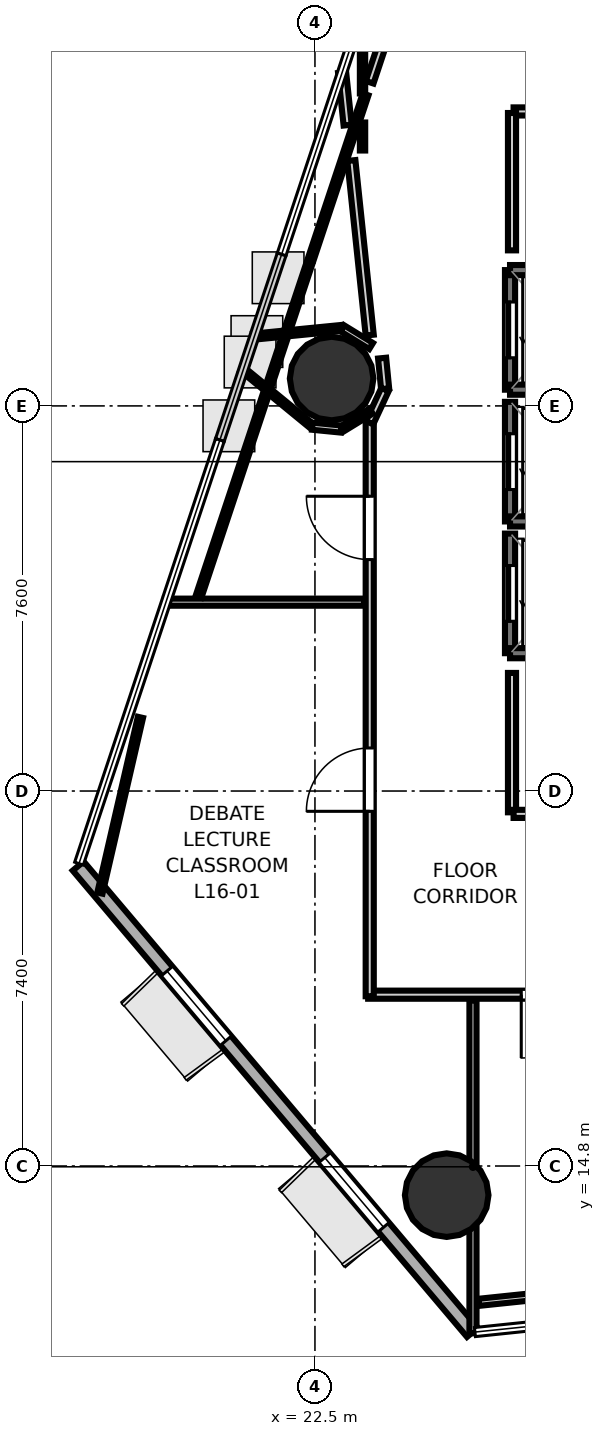
"""IFC4 building model, lengths in metres.
Left out: names, types, materials, properties, quantities, classifications, styles, units other than length and angle.
Written with IfcOpenShell. Run it as: python <this file> out.ifc"""

import sys

from ifc_helpers import new_model, si_unit, direction, frame, frame_2d, origin, origin_2d, place, context, subcontext, project, spatial, rectangle, hollow_circle, extrude, element, fill, save


model = new_model("IFC4")
c1 = context("Model", 3, precision=1e-05, world=origin(), true_north=direction((0.0, 1.0)))
c2 = subcontext(c1, "Body", "Model", "MODEL_VIEW")
j1 = project(units=[si_unit("LENGTHUNIT", "METRE"), si_unit("PLANEANGLEUNIT", "RADIAN")], contexts=[c1])
p1 = place(None, origin())
s1 = spatial("IfcSite", under=j1, at=p1, CompositionType="ELEMENT")
p2 = place(p1, origin())
s2 = spatial("IfcBuilding", under=s1, at=p2, CompositionType="ELEMENT")
p3 = place(p2, frame((0.0, 0.0, 67.3)))
s3 = spatial("IfcBuildingStorey", under=s2, at=p3, CompositionType="ELEMENT", Elevation=67.3)
for number, where, z_axis, x_axis in (
    (1, (22.829, 30.34, 0.0), (0.0, 0.0, 1.0), (1.0, 0.0, 0.0)),
    (2, (25.1, 14.225, 0.0), (0.0, 0.0, 1.0), (1.0, 0.0, 0.0)),
):
    element("IfcColumn", number, at=place(p3, frame(where, z_axis=z_axis, x_axis=x_axis)), inside=s3, PredefinedType="COLUMN", context=c2, shape_type="SweptSolid", body=[
        extrude(hollow_circle(Radius=0.825, WallThickness=0.04, at=origin_2d()), origin(), (0.0, 0.0, 1.0), 3.7),
    ])
p4 = place(p3, frame((17.827, 20.72, 0.0), z_axis=(0.0, 0.0, 1.0), x_axis=(0.645636137958, -0.763645190755, 0.0)))
e3 = element("IfcWall", 3, at=p4, inside=s3, PredefinedType="SOLIDWALL", context=c2, shape_type="SweptSolid", body=[
    extrude(rectangle(XDim=12.051, YDim=0.28, at=frame_2d((6.025, 0.0))), origin(), (0.0, 0.0, 1.0), 3.52),
])
p5 = place(p4, frame((2.715, 0.0, 0.85)))
e4 = element("IfcOpeningElement", 4, at=p5, cuts=e3, PredefinedType="OPENING", context=c2, shape_type="SweptSolid", body=[
    extrude(rectangle(XDim=1.8, YDim=2.1, at=frame_2d((0.9, 1.05))), frame((0.0, 0.15, 0.0), z_axis=(0.0, -1.0, 0.0), x_axis=(1.0, 0.0, 0.0)), (0.0, 0.0, 1.0), 0.3),
])
p6 = place(p4, frame((7.536, 0.0, 0.85)))
e5 = element("IfcOpeningElement", 5, at=p6, cuts=e3, PredefinedType="OPENING", context=c2, shape_type="SweptSolid", body=[
    extrude(rectangle(XDim=1.8, YDim=2.1, at=frame_2d((0.9, 1.05))), frame((0.0, 0.15, 0.0), z_axis=(0.0, -1.0, 0.0), x_axis=(1.0, 0.0, 0.0)), (0.0, 0.0, 1.0), 0.3),
])
p7 = place(p3, frame((26.35, 30.12, 0.0), z_axis=(0.0, 0.0, 1.0), x_axis=(0.0, 1.0, 0.0)))
e6 = element("IfcWall", 6, at=p7, inside=s3, PredefinedType="SOLIDWALL", context=c2, shape_type="SweptSolid", body=[
    extrude(rectangle(XDim=2.36, YDim=0.2, at=frame_2d((1.18, 0.0))), origin(), (0.0, 0.0, 1.0), 3.52),
])
p8 = place(p7, frame((0.63, 0.0, 0.0)))
e7 = element("IfcOpeningElement", 7, at=p8, cuts=e6, PredefinedType="OPENING", context=c2, shape_type="SweptSolid", body=[
    extrude(rectangle(XDim=1.1, YDim=2.15, at=frame_2d((0.55, 1.075))), frame((0.0, 0.11, 0.0), z_axis=(0.0, -1.0, 0.0), x_axis=(1.0, 0.0, 0.0)), (0.0, 0.0, 1.0), 0.22),
])
for number, where, z_axis, x_axis in (
    (8, (26.35, 32.48, 0.0), (0.0, 0.0, 1.0), (1.0, 0.0, 0.0)),
    (9, (26.35, 30.12, 0.0), (0.0, 0.0, 1.0), (1.0, 0.0, 0.0)),
):
    element("IfcWall", number, at=place(p3, frame(where, z_axis=z_axis, x_axis=x_axis)), inside=s3, PredefinedType="SOLIDWALL", context=c2, shape_type="SweptSolid", body=[
        extrude(rectangle(XDim=2.1, YDim=0.2, at=frame_2d((1.05, 0.0))), origin(), (0.0, 0.0, 1.0), 3.52),
    ])
p9 = place(p3, frame((26.35, 27.52, 0.0), z_axis=(0.0, 0.0, 1.0), x_axis=(0.0, 1.0, 0.0)))
e10 = element("IfcWall", 10, at=p9, inside=s3, PredefinedType="SOLIDWALL", context=c2, shape_type="SweptSolid", body=[
    extrude(rectangle(XDim=2.36, YDim=0.2, at=frame_2d((1.18, 0.0))), origin(), (0.0, 0.0, 1.0), 3.52),
])
p10 = place(p9, frame((0.63, 0.0, 0.0)))
e11 = element("IfcOpeningElement", 11, at=p10, cuts=e10, PredefinedType="OPENING", context=c2, shape_type="SweptSolid", body=[
    extrude(rectangle(XDim=1.1, YDim=2.15, at=frame_2d((0.55, 1.075))), frame((0.0, 0.11, 0.0), z_axis=(0.0, -1.0, 0.0), x_axis=(1.0, 0.0, 0.0)), (0.0, 0.0, 1.0), 0.22),
])
p11 = place(p3, frame((26.35, 27.52, 0.0), z_axis=(0.0, 0.0, 1.0), x_axis=(1.0, 0.0, 0.0)))
e12 = element("IfcWall", 12, at=p11, inside=s3, PredefinedType="SOLIDWALL", context=c2, shape_type="SweptSolid", body=[
    extrude(rectangle(XDim=2.1, YDim=0.2, at=frame_2d((1.05, 0.0))), origin(), (0.0, 0.0, 1.0), 3.52),
])
p12 = place(p3, frame((26.35, 24.92, 0.0), z_axis=(0.0, 0.0, 1.0), x_axis=(0.0, 1.0, 0.0)))
e13 = element("IfcWall", 13, at=p12, inside=s3, PredefinedType="SOLIDWALL", context=c2, shape_type="SweptSolid", body=[
    extrude(rectangle(XDim=2.36, YDim=0.2, at=frame_2d((1.18, 0.0))), origin(), (0.0, 0.0, 1.0), 3.52),
])
p13 = place(p12, frame((0.63, 0.0, 0.0)))
e14 = element("IfcOpeningElement", 14, at=p13, cuts=e13, PredefinedType="OPENING", context=c2, shape_type="SweptSolid", body=[
    extrude(rectangle(XDim=1.1, YDim=2.15, at=frame_2d((0.55, 1.075))), frame((0.0, 0.11, 0.0), z_axis=(0.0, -1.0, 0.0), x_axis=(1.0, 0.0, 0.0)), (0.0, 0.0, 1.0), 0.22),
])
p14 = place(p3, frame((26.35, 24.92, 0.0), z_axis=(0.0, 0.0, 1.0), x_axis=(1.0, 0.0, 0.0)))
e15 = element("IfcWall", 15, at=p14, inside=s3, PredefinedType="SOLIDWALL", context=c2, shape_type="SweptSolid", body=[
    extrude(rectangle(XDim=2.1, YDim=0.2, at=frame_2d((1.05, 0.0))), origin(), (0.0, 0.0, 1.0), 3.52),
])
p15 = place(p3, frame((23.581, 31.197, 0.0), z_axis=(0.0, 0.0, 1.0), x_axis=(-0.104644434472, 0.994509699467, 0.0)))
e16 = element("IfcWall", 16, at=p15, inside=s3, PredefinedType="PARTITIONING", context=c2, shape_type="SweptSolid", body=[
    extrude(rectangle(XDim=3.465, YDim=0.16, at=frame_2d((1.732, 0.0))), origin(), (0.0, 0.0, 1.0), 2.798),
])
p16 = place(p3, frame((23.579, 36.187, 0.0), z_axis=(0.0, 0.0, 1.0), x_axis=(0.315640384711, 0.948878889816, 0.0)))
e17 = element("IfcWall", 17, at=p16, inside=s3, PredefinedType="PARTITIONING", context=c2, shape_type="SweptSolid", body=[
    extrude(rectangle(XDim=2.743, YDim=0.16, at=frame_2d((1.372, 0.0))), origin(), (0.0, 0.0, 1.0), 2.84),
])
p17 = place(p3, frame((29.7, 35.611, 0.0), z_axis=(0.0, 0.0, 1.0), x_axis=(-1.0, 0.0, 0.0)))
e18 = element("IfcWall", 18, at=p17, inside=s3, PredefinedType="PARTITIONING", context=c2, shape_type="SweptSolid", body=[
    extrude(rectangle(XDim=3.28, YDim=0.16, at=frame_2d((1.64, 0.0))), origin(), (0.0, 0.0, 1.0), 2.798),
])
p18 = place(p3, frame((26.389, 35.58, 0.0), z_axis=(0.0, 0.0, 1.0), x_axis=(0.0, -1.0, 0.0)))
e19 = element("IfcWall", 19, at=p18, inside=s3, PredefinedType="PARTITIONING", context=c2, shape_type="SweptSolid", body=[
    extrude(rectangle(XDim=2.71, YDim=0.16, at=frame_2d((1.355, 0.0))), origin(), (0.0, 0.0, 1.0), 2.798),
])
p19 = place(p3, frame((26.389, 24.531, 0.0), z_axis=(0.0, 0.0, 1.0), x_axis=(0.0, -1.0, 0.0)))
e20 = element("IfcWall", 20, at=p19, inside=s3, PredefinedType="PARTITIONING", context=c2, shape_type="SweptSolid", body=[
    extrude(rectangle(XDim=2.75, YDim=0.16, at=frame_2d((1.375, 0.0))), origin(), (0.0, 0.0, 1.0), 2.84),
])
p20 = place(p3, frame((26.42, 21.749, 0.0), z_axis=(0.0, 0.0, 1.0), x_axis=(1.0, 0.0, 0.0)))
e21 = element("IfcWall", 21, at=p20, inside=s3, PredefinedType="PARTITIONING", context=c2, shape_type="SweptSolid", body=[
    extrude(rectangle(XDim=3.28, YDim=0.16, at=frame_2d((1.64, 0.0))), origin(), (0.0, 0.0, 1.0), 2.84),
])
p21 = place(p3, frame((33.32, 18.181, 0.0), z_axis=(0.0, 0.0, 1.0), x_axis=(-1.0, 0.0, 0.0)))
e22 = element("IfcWall", 22, at=p21, inside=s3, PredefinedType="PARTITIONING", context=c2, shape_type="SweptSolid", body=[
    extrude(rectangle(XDim=9.77, YDim=0.16, at=frame_2d((4.885, 0.0))), origin(), (0.0, 0.0, 1.0), 2.798),
])
p22 = place(p21, frame((5.499, 0.0, 0.0)))
e23 = element("IfcOpeningElement", 23, at=p22, cuts=e22, PredefinedType="OPENING", context=c2, shape_type="SweptSolid", body=[
    extrude(rectangle(XDim=1.25, YDim=2.2, at=frame_2d((0.625, 1.1))), frame((0.0, 0.09, 0.0), z_axis=(0.0, -1.0, 0.0), x_axis=(1.0, 0.0, 0.0)), (0.0, 0.0, 1.0), 0.18),
])
p23 = place(p3, frame((23.581, 18.15, 0.0), z_axis=(0.0, 0.0, 1.0), x_axis=(0.0, 1.0, 0.0)))
e24 = element("IfcWall", 24, at=p23, inside=s3, PredefinedType="PARTITIONING", context=c2, shape_type="SweptSolid", body=[
    extrude(rectangle(XDim=11.333, YDim=0.16, at=frame_2d((5.667, 0.0))), origin(), (0.0, 0.0, 1.0), 2.798),
])
p24 = place(p23, frame((3.649, 0.0, 0.0)))
e25 = element("IfcOpeningElement", 25, at=p24, cuts=e24, PredefinedType="OPENING", context=c2, shape_type="SweptSolid", body=[
    extrude(rectangle(XDim=1.25, YDim=2.2, at=frame_2d((0.625, 1.1))), frame((0.0, 0.09, 0.0), z_axis=(0.0, -1.0, 0.0), x_axis=(1.0, 0.0, 0.0)), (0.0, 0.0, 1.0), 0.18),
])
p25 = place(p23, frame((8.617, 0.0, 0.0)))
e26 = element("IfcOpeningElement", 26, at=p25, cuts=e24, PredefinedType="OPENING", context=c2, shape_type="SweptSolid", body=[
    extrude(rectangle(XDim=1.25, YDim=2.2, at=frame_2d((0.625, 1.1))), frame((0.0, 0.09, 0.0), z_axis=(0.0, -1.0, 0.0), x_axis=(1.0, 0.0, 0.0)), (0.0, 0.0, 1.0), 0.18),
])
p26 = place(p3, frame((23.578, 29.47, 0.0), z_axis=(0.0, 0.0, 1.0), x_axis=(0.421827918194, 0.906675910914, 0.0)))
e27 = element("IfcWall", 27, at=p26, inside=s3, PredefinedType="PARTITIONING", context=c2, shape_type="SweptSolid", body=[
    extrude(rectangle(XDim=0.72, YDim=0.16, at=frame_2d((0.36, 0.0))), origin(), (0.0, 0.0, 1.0), 2.84),
])
p27 = place(p3, frame((23.885, 30.139, 0.0), z_axis=(0.0, 0.0, 1.0), x_axis=(-0.0981888168, 0.995167803064, 0.0)))
e28 = element("IfcWall", 28, at=p27, inside=s3, PredefinedType="PARTITIONING", context=c2, shape_type="SweptSolid", body=[
    extrude(rectangle(XDim=0.607, YDim=0.16, at=frame_2d((0.303, 0.0))), origin(), (0.0, 0.0, 1.0), 2.84),
])
p28 = place(p3, frame((25.619, 18.07, 0.0), z_axis=(0.0, 0.0, 1.0), x_axis=(0.0, -1.0, 0.0)))
e29 = element("IfcWall", 29, at=p28, inside=s3, PredefinedType="PARTITIONING", context=c2, shape_type="SweptSolid", body=[
    extrude(rectangle(XDim=6.571, YDim=0.14, at=frame_2d((3.286, 0.0))), origin(), (0.0, 0.0, 1.0), 2.798),
])
p29 = place(p3, frame((18.257, 20.186, 0.0), z_axis=(0.0, 0.0, 1.0), x_axis=(0.224608979618, 0.974448975716, 0.0)))
e30 = element("IfcWall", 30, at=p29, inside=s3, PredefinedType="PARTITIONING", context=c2, shape_type="SweptSolid", body=[
    extrude(rectangle(XDim=3.559, YDim=0.105, at=frame_2d((1.779, 0.0))), origin(), (0.0, 0.0, 1.0), 2.84),
])
p30 = place(p3, frame((19.539, 25.927, 0.0), z_axis=(0.0, 0.0, 1.0), x_axis=(1.0, 0.0, 0.0)))
e31 = element("IfcWall", 31, at=p30, inside=s3, PredefinedType="PARTITIONING", context=c2, shape_type="SweptSolid", body=[
    extrude(rectangle(XDim=3.931, YDim=0.14, at=frame_2d((1.965, 0.0))), origin(), (0.0, 0.0, 1.0), 2.798),
])
p31 = place(p3, frame((33.699, 12.941, 0.0), z_axis=(0.0, 0.0, 1.0), x_axis=(-0.994606169047, -0.103723519483, 0.0)))
e32 = element("IfcWall", 32, at=p31, inside=s3, PredefinedType="PARTITIONING", context=c2, shape_type="SweptSolid", body=[
    extrude(rectangle(XDim=8.012, YDim=0.14, at=frame_2d((4.006, 0.0))), origin(), (0.0, 0.0, 1.0), 2.84),
])
p32 = place(p3, frame((23.608, 30.982, 0.0), z_axis=(0.0, 0.0, 1.0), x_axis=(-0.852045812822, 0.523467222328, 0.0)))
e33 = element("IfcWall", 33, at=p32, inside=s3, PredefinedType="PARTITIONING", context=c2, shape_type="SweptSolid", body=[
    extrude(rectangle(XDim=0.67, YDim=0.14, at=frame_2d((0.335, 0.0))), origin(), (0.0, 0.0, 1.0), 2.798),
])
p33 = place(p3, frame((23.018, 31.337, 0.0), z_axis=(0.0, 0.0, 1.0), x_axis=(-0.995198081746, -0.097881449154, 0.0)))
e34 = element("IfcWall", 34, at=p33, inside=s3, PredefinedType="PARTITIONING", context=c2, shape_type="SweptSolid", body=[
    extrude(rectangle(XDim=1.743, YDim=0.12, at=frame_2d((0.872, 0.0))), origin(), (0.0, 0.0, 1.0), 2.798),
])
p34 = place(p3, frame((21.069, 30.525, 0.0), z_axis=(0.0, 0.0, 1.0), x_axis=(0.772988075941, -0.63442055015, 0.0)))
e35 = element("IfcWall", 35, at=p34, inside=s3, PredefinedType="PARTITIONING", context=c2, shape_type="SweptSolid", body=[
    extrude(rectangle(XDim=1.764, YDim=0.105, at=frame_2d((0.882, 0.0))), origin(), (0.0, 0.0, 1.0), 2.798),
])
p35 = place(p3, frame((22.449, 29.399, 0.0), z_axis=(0.0, 0.0, 1.0), x_axis=(0.995167364461, -0.098193262045, 0.0)))
e36 = element("IfcWall", 36, at=p35, inside=s3, PredefinedType="PARTITIONING", context=c2, shape_type="SweptSolid", body=[
    extrude(rectangle(XDim=0.572, YDim=0.14, at=frame_2d((0.286, 0.0))), origin(), (0.0, 0.0, 1.0), 2.798),
])
p36 = place(p3, frame((23.037, 29.347, 0.0), z_axis=(0.0, 0.0, 1.0), x_axis=(0.852045812822, 0.523467222328, 0.0)))
e37 = element("IfcWall", 37, at=p36, inside=s3, PredefinedType="PARTITIONING", context=c2, shape_type="SweptSolid", body=[
    extrude(rectangle(XDim=0.67, YDim=0.12, at=frame_2d((0.335, 0.0))), origin(), (0.0, 0.0, 1.0), 2.798),
])
p37 = place(p3, frame((20.201, 26.032, 0.0), z_axis=(0.0, 0.0, 1.0), x_axis=(0.315652901444, 0.948874726089, 0.0)))
e38 = element("IfcWall", 38, at=p37, inside=s3, PredefinedType="PARTITIONING", context=c2, shape_type="SweptSolid", body=[
    extrude(rectangle(XDim=10.448, YDim=0.12, at=frame_2d((5.224, 0.0))), origin(), (0.0, 0.0, 1.0), 2.798),
])
p38 = place(p3, frame((23.439, 37.609, 0.0), z_axis=(0.0, 0.0, 1.0), x_axis=(0.0, -1.0, 0.0)))
e39 = element("IfcWall", 39, at=p38, inside=s3, PredefinedType="PARTITIONING", context=c2, shape_type="SweptSolid", body=[
    extrude(rectangle(XDim=1.643, YDim=0.105, at=frame_2d((0.821, 0.0))), origin(), (0.0, 0.0, 1.0), 2.84),
])
p39 = place(p3, frame((23.145, 35.341, 0.0), z_axis=(0.0, 0.0, 1.0), x_axis=(-0.104623865152, 0.9945118636, 0.0)))
e40 = element("IfcWall", 40, at=p39, inside=s3, PredefinedType="PARTITIONING", context=c2, shape_type="SweptSolid", body=[
    extrude(rectangle(XDim=1.043, YDim=0.16, at=frame_2d((0.521, 0.0))), origin(), (0.0, 0.0, 1.0), 2.798),
])
p40 = place(p3, frame((23.439, 35.393, 0.0), z_axis=(0.0, 0.0, 1.0), x_axis=(0.0, -1.0, 0.0)))
e41 = element("IfcWall", 41, at=p40, inside=s3, PredefinedType="PARTITIONING", context=c2, shape_type="SweptSolid", body=[
    extrude(rectangle(XDim=0.553, YDim=0.105, at=frame_2d((0.276, 0.0))), origin(), (0.0, 0.0, 1.0), 2.84),
])
p41 = place(p8, origin())
e42 = element("IfcDoor", 42, at=p41, inside=s3, OperationType="SLIDING_TO_LEFT", PredefinedType="DOOR", context=c2, shape_type="SweptSolid", body=[
    extrude(rectangle(XDim=1.1, YDim=2.15, at=frame_2d((0.55, 1.075))), frame((0.0, 0.025, 0.0), z_axis=(0.0, -1.0, 0.0), x_axis=(1.0, 0.0, 0.0)), (0.0, 0.0, 1.0), 0.05),
])
fill(e7, e42)
p42 = place(p10, origin())
e43 = element("IfcDoor", 43, at=p42, inside=s3, OperationType="SLIDING_TO_LEFT", PredefinedType="DOOR", context=c2, shape_type="SweptSolid", body=[
    extrude(rectangle(XDim=1.1, YDim=2.15, at=frame_2d((0.55, 1.075))), frame((0.0, 0.025, 0.0), z_axis=(0.0, -1.0, 0.0), x_axis=(1.0, 0.0, 0.0)), (0.0, 0.0, 1.0), 0.05),
])
fill(e11, e43)
p43 = place(p13, origin())
e44 = element("IfcDoor", 44, at=p43, inside=s3, OperationType="SLIDING_TO_LEFT", PredefinedType="DOOR", context=c2, shape_type="SweptSolid", body=[
    extrude(rectangle(XDim=1.1, YDim=2.15, at=frame_2d((0.55, 1.075))), frame((0.0, 0.025, 0.0), z_axis=(0.0, -1.0, 0.0), x_axis=(1.0, 0.0, 0.0)), (0.0, 0.0, 1.0), 0.05),
])
fill(e14, e44)
p44 = place(p24, origin())
e45 = element("IfcDoor", 45, at=p44, inside=s3, OperationType="SINGLE_SWING_LEFT", PredefinedType="DOOR", context=c2, shape_type="SweptSolid", body=[
    extrude(rectangle(XDim=1.25, YDim=2.2, at=frame_2d((0.625, 1.1))), frame((0.0, 0.025, 0.0), z_axis=(0.0, -1.0, 0.0), x_axis=(1.0, 0.0, 0.0)), (0.0, 0.0, 1.0), 0.05),
])
fill(e25, e45)
p45 = place(p22, origin())
e46 = element("IfcDoor", 46, at=p45, inside=s3, OperationType="SINGLE_SWING_RIGHT", PredefinedType="DOOR", context=c2, shape_type="SweptSolid", body=[
    extrude(rectangle(XDim=1.25, YDim=2.2, at=frame_2d((0.625, 1.1))), frame((0.0, 0.025, 0.0), z_axis=(0.0, -1.0, 0.0), x_axis=(1.0, 0.0, 0.0)), (0.0, 0.0, 1.0), 0.05),
])
fill(e23, e46)
p46 = place(p25, origin())
e47 = element("IfcDoor", 47, at=p46, inside=s3, OperationType="SINGLE_SWING_RIGHT", PredefinedType="DOOR", context=c2, shape_type="SweptSolid", body=[
    extrude(rectangle(XDim=1.25, YDim=2.2, at=frame_2d((0.625, 1.1))), frame((0.0, 0.025, 0.0), z_axis=(0.0, -1.0, 0.0), x_axis=(1.0, 0.0, 0.0)), (0.0, 0.0, 1.0), 0.05),
])
fill(e26, e47)
p47 = place(p5, origin())
e48 = element("IfcWindow", 48, at=p47, inside=s3, PartitioningType="SINGLE_PANEL", PredefinedType="WINDOW", context=c2, shape_type="SweptSolid", body=[
    extrude(rectangle(XDim=1.8, YDim=2.1, at=frame_2d((0.9, 1.05))), frame((0.0, 0.03, 0.0), z_axis=(0.0, -1.0, 0.0), x_axis=(1.0, 0.0, 0.0)), (0.0, 0.0, 1.0), 0.06),
])
fill(e4, e48)
p48 = place(p6, origin())
e49 = element("IfcWindow", 49, at=p48, inside=s3, PartitioningType="SINGLE_PANEL", PredefinedType="WINDOW", context=c2, shape_type="SweptSolid", body=[
    extrude(rectangle(XDim=1.8, YDim=2.1, at=frame_2d((0.9, 1.05))), frame((0.0, 0.03, 0.0), z_axis=(0.0, -1.0, 0.0), x_axis=(1.0, 0.0, 0.0)), (0.0, 0.0, 1.0), 0.06),
])
fill(e5, e49)
save(model, sys.argv[1])
